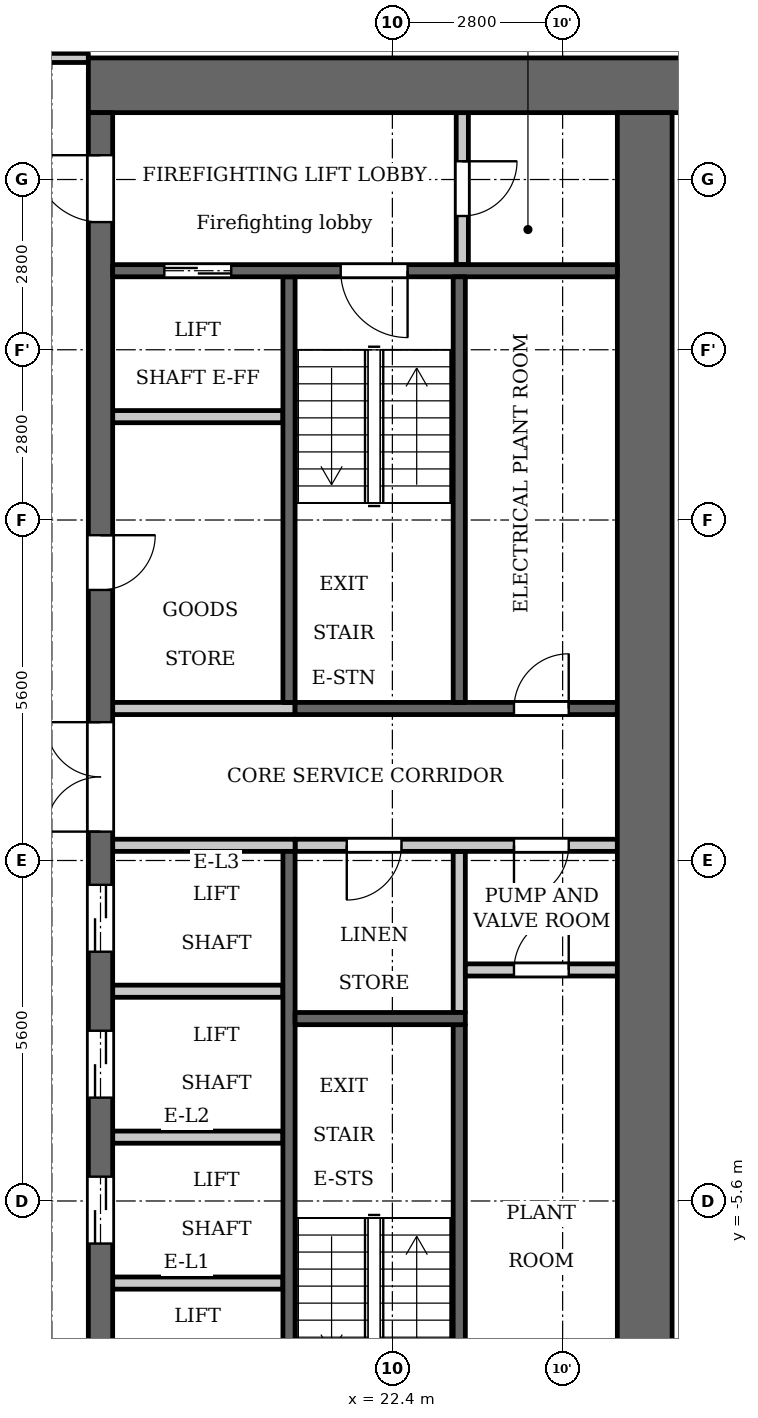
"""IFC4 building model, lengths in metres.
Left out: names, types, materials, properties, quantities, classifications, styles, units other than length and angle.
Written with IfcOpenShell. Run it as: python <this file> out.ifc"""

import sys

from ifc_helpers import new_model, si_unit, direction, frame, frame_2d, origin, place, context, subcontext, project, spatial, rectangle, extrude, element, fill, save


model = new_model("IFC4")
c1 = context("Model", 3, precision=1e-05, world=origin(), true_north=direction((0.0, 1.0)))
c2 = subcontext(c1, "Body", "Model", "MODEL_VIEW")
j1 = project(units=[si_unit("LENGTHUNIT", "METRE"), si_unit("PLANEANGLEUNIT", "RADIAN")], contexts=[c1])
p1 = place(None, origin())
s1 = spatial("IfcSite", under=j1, at=p1, CompositionType="ELEMENT")
p2 = place(p1, origin())
s2 = spatial("IfcBuilding", under=s1, at=p2, CompositionType="ELEMENT")
p3 = place(p2, frame((0.0, 0.0, 30.5)))
s3 = spatial("IfcBuildingStorey", under=s2, at=p3, CompositionType="ELEMENT", Elevation=30.5)
p4 = place(p3, frame((23.5, -2.5, 0.0), z_axis=(0.0, 0.0, 1.0), x_axis=(0.0, 1.0, 0.0)))
e1 = element("IfcWall", 1, at=p4, inside=s3, PredefinedType="PARTITIONING", context=c2, shape_type="SweptSolid", body=[
    extrude(rectangle(XDim=2.65, YDim=0.2, at=frame_2d((1.325, 0.0))), origin(), (0.0, 0.0, 1.0), 3.2),
])
p5 = place(p3, frame((20.7, 2.6, 0.0), z_axis=(0.0, 0.0, 1.0), x_axis=(0.0, 1.0, 0.0)))
e2 = element("IfcWall", 2, at=p5, inside=s3, PredefinedType="SHEAR", context=c2, shape_type="SweptSolid", body=[
    extrude(rectangle(XDim=7.0, YDim=0.2, at=frame_2d((3.5, 0.0))), origin(), (0.0, 0.0, 1.0), 3.2),
])
p6 = place(p3, frame((20.7, -9.6, 0.0), z_axis=(0.0, 0.0, 1.0), x_axis=(0.0, 1.0, 0.0)))
e3 = element("IfcWall", 3, at=p6, inside=s3, PredefinedType="SHEAR", context=c2, shape_type="SweptSolid", body=[
    extrude(rectangle(XDim=9.75, YDim=0.2, at=frame_2d((4.875, 0.0))), origin(), (0.0, 0.0, 1.0), 3.2),
])
p7 = place(p3, frame((20.8, 2.5, 0.0), z_axis=(0.0, 0.0, 1.0), x_axis=(1.0, 0.0, 0.0)))
e4 = element("IfcWall", 4, at=p7, inside=s3, PredefinedType="SHEAR", context=c2, shape_type="SweptSolid", body=[
    extrude(rectangle(XDim=5.3, YDim=0.2, at=frame_2d((2.65, 0.0))), origin(), (0.0, 0.0, 1.0), 3.2),
])
p8 = place(p7, frame((3.6, 0.0, 0.0)))
e5 = element("IfcOpeningElement", 5, at=p8, cuts=e4, PredefinedType="OPENING", context=c2, shape_type="SweptSolid", body=[
    extrude(rectangle(XDim=0.9, YDim=2.1, at=frame_2d((0.45, 1.05))), frame((0.0, 0.11, 0.0), z_axis=(0.0, -1.0, 0.0), x_axis=(1.0, 0.0, 0.0)), (0.0, 0.0, 1.0), 0.22),
])
p9 = place(p3, frame((20.8, 0.25, 0.0), z_axis=(0.0, 0.0, 1.0), x_axis=(1.0, 0.0, 0.0)))
e6 = element("IfcWall", 6, at=p9, inside=s3, PredefinedType="PARTITIONING", context=c2, shape_type="SweptSolid", body=[
    extrude(rectangle(XDim=5.3, YDim=0.2, at=frame_2d((2.65, 0.0))), origin(), (0.0, 0.0, 1.0), 3.2),
])
p10 = place(p9, frame((0.85, 0.0, 0.0)))
e7 = element("IfcOpeningElement", 7, at=p10, cuts=e6, PredefinedType="OPENING", context=c2, shape_type="SweptSolid", body=[
    extrude(rectangle(XDim=0.9, YDim=2.1, at=frame_2d((0.45, 1.05))), frame((0.0, 0.11, 0.0), z_axis=(0.0, -1.0, 0.0), x_axis=(1.0, 0.0, 0.0)), (0.0, 0.0, 1.0), 0.22),
])
p11 = place(p9, frame((3.6, 0.0, 0.0)))
e8 = element("IfcOpeningElement", 8, at=p11, cuts=e6, PredefinedType="OPENING", context=c2, shape_type="SweptSolid", body=[
    extrude(rectangle(XDim=0.9, YDim=2.1, at=frame_2d((0.45, 1.05))), frame((0.0, 0.11, 0.0), z_axis=(0.0, -1.0, 0.0), x_axis=(1.0, 0.0, 0.0)), (0.0, 0.0, 1.0), 0.22),
])
p12 = place(p3, frame((17.4, 12.75, 0.0), z_axis=(0.0, 0.0, 1.0), x_axis=(1.0, 0.0, 0.0)))
e9 = element("IfcWall", 9, at=p12, inside=s3, PredefinedType="SHEAR", context=c2, shape_type="SweptSolid", body=[
    extrude(rectangle(XDim=10.4, YDim=0.9, at=frame_2d((5.2, 0.0))), origin(), (0.0, 0.0, 1.0), 3.2),
])
p13 = place(p3, frame((17.6, -12.3, 0.0), z_axis=(0.0, 0.0, 1.0), x_axis=(0.0, 1.0, 0.0)))
e10 = element("IfcWall", 10, at=p13, inside=s3, PredefinedType="SHEAR", context=c2, shape_type="SweptSolid", body=[
    extrude(rectangle(XDim=24.6, YDim=0.4, at=frame_2d((12.3, 0.0))), origin(), (0.0, 0.0, 1.0), 3.2),
])
p14 = place(p13, frame((6.0, 0.0, 0.0)))
e11 = element("IfcOpeningElement", 11, at=p14, cuts=e10, PredefinedType="OPENING", context=c2, shape_type="SweptSolid", body=[
    extrude(rectangle(XDim=1.1, YDim=2.1, at=frame_2d((0.55, 1.05))), frame((0.0, 0.21, 0.0), z_axis=(0.0, -1.0, 0.0), x_axis=(1.0, 0.0, 0.0)), (0.0, 0.0, 1.0), 0.42),
])
p15 = place(p13, frame((8.4, 0.0, 0.0)))
e12 = element("IfcOpeningElement", 12, at=p15, cuts=e10, PredefinedType="OPENING", context=c2, shape_type="SweptSolid", body=[
    extrude(rectangle(XDim=1.1, YDim=2.1, at=frame_2d((0.55, 1.05))), frame((0.0, 0.21, 0.0), z_axis=(0.0, -1.0, 0.0), x_axis=(1.0, 0.0, 0.0)), (0.0, 0.0, 1.0), 0.42),
])
p16 = place(p13, frame((10.8, 0.0, 0.0)))
e13 = element("IfcOpeningElement", 13, at=p16, cuts=e10, PredefinedType="OPENING", context=c2, shape_type="SweptSolid", body=[
    extrude(rectangle(XDim=1.1, YDim=2.1, at=frame_2d((0.55, 1.05))), frame((0.0, 0.21, 0.0), z_axis=(0.0, -1.0, 0.0), x_axis=(1.0, 0.0, 0.0)), (0.0, 0.0, 1.0), 0.42),
])
p17 = place(p13, frame((16.75, 0.0, 0.0)))
e14 = element("IfcOpeningElement", 14, at=p17, cuts=e10, PredefinedType="OPENING", context=c2, shape_type="SweptSolid", body=[
    extrude(rectangle(XDim=0.9, YDim=2.1, at=frame_2d((0.45, 1.05))), frame((0.0, 0.21, 0.0), z_axis=(0.0, -1.0, 0.0), x_axis=(1.0, 0.0, 0.0)), (0.0, 0.0, 1.0), 0.42),
])
p18 = place(p13, frame((22.8, 0.0, 0.0)))
e15 = element("IfcOpeningElement", 15, at=p18, cuts=e10, PredefinedType="OPENING", context=c2, shape_type="SweptSolid", body=[
    extrude(rectangle(XDim=1.1, YDim=2.1, at=frame_2d((0.55, 1.05))), frame((0.0, 0.21, 0.0), z_axis=(0.0, -1.0, 0.0), x_axis=(1.0, 0.0, 0.0)), (0.0, 0.0, 1.0), 0.42),
])
p19 = place(p13, frame((0.7, 0.0, 0.0)))
e16 = element("IfcOpeningElement", 16, at=p19, cuts=e10, PredefinedType="OPENING", context=c2, shape_type="SweptSolid", body=[
    extrude(rectangle(XDim=1.1, YDim=2.1, at=frame_2d((0.55, 1.05))), frame((0.0, 0.21, 0.0), z_axis=(0.0, -1.0, 0.0), x_axis=(1.0, 0.0, 0.0)), (0.0, 0.0, 1.0), 0.42),
])
p20 = place(p13, frame((12.775, 0.0, 0.0)))
e17 = element("IfcOpeningElement", 17, at=p20, cuts=e10, PredefinedType="OPENING", context=c2, shape_type="SweptSolid", body=[
    extrude(rectangle(XDim=1.8, YDim=2.1, at=frame_2d((0.9, 1.05))), frame((0.0, 0.21, 0.0), z_axis=(0.0, -1.0, 0.0), x_axis=(1.0, 0.0, 0.0)), (0.0, 0.0, 1.0), 0.42),
])
p21 = place(p3, frame((26.55, -12.3, 0.0), z_axis=(0.0, 0.0, 1.0), x_axis=(0.0, 1.0, 0.0)))
e18 = element("IfcWall", 18, at=p21, inside=s3, PredefinedType="SHEAR", context=c2, shape_type="SweptSolid", body=[
    extrude(rectangle(XDim=24.6, YDim=0.9, at=frame_2d((12.3, 0.0))), origin(), (0.0, 0.0, 1.0), 3.2),
])
p22 = place(p3, frame((23.55, 9.8, 0.0), z_axis=(0.0, 0.0, 1.0), x_axis=(0.0, 1.0, 0.0)))
e19 = element("IfcWall", 19, at=p22, inside=s3, PredefinedType="PARTITIONING", context=c2, shape_type="SweptSolid", body=[
    extrude(rectangle(XDim=2.5, YDim=0.2, at=frame_2d((1.25, 0.0))), origin(), (0.0, 0.0, 1.0), 3.2),
])
p23 = place(p22, frame((0.8, 0.0, 0.0)))
e20 = element("IfcOpeningElement", 20, at=p23, cuts=e19, PredefinedType="OPENING", context=c2, shape_type="SweptSolid", body=[
    extrude(rectangle(XDim=0.9, YDim=2.1, at=frame_2d((0.45, 1.05))), frame((0.0, 0.11, 0.0), z_axis=(0.0, -1.0, 0.0), x_axis=(1.0, 0.0, 0.0)), (0.0, 0.0, 1.0), 0.22),
])
p24 = place(p3, frame((23.6, -1.8, 0.0), z_axis=(0.0, 0.0, 1.0), x_axis=(1.0, 0.0, 0.0)))
e21 = element("IfcWall", 21, at=p24, inside=s3, PredefinedType="PARTITIONING", context=c2, shape_type="SweptSolid", body=[
    extrude(rectangle(XDim=2.5, YDim=0.2, at=frame_2d((1.25, 0.0))), origin(), (0.0, 0.0, 1.0), 3.2),
])
p25 = place(p24, frame((0.8, 0.0, 0.0)))
e22 = element("IfcOpeningElement", 22, at=p25, cuts=e21, PredefinedType="OPENING", context=c2, shape_type="SweptSolid", body=[
    extrude(rectangle(XDim=0.9, YDim=2.1, at=frame_2d((0.45, 1.05))), frame((0.0, 0.11, 0.0), z_axis=(0.0, -1.0, 0.0), x_axis=(1.0, 0.0, 0.0)), (0.0, 0.0, 1.0), 0.22),
])
for number, where, z_axis, x_axis in (
    (23, (17.8, -6.95, 0.0), (0.0, 0.0, 1.0), (1.0, 0.0, 0.0)),
    (24, (17.8, -4.55, 0.0), (0.0, 0.0, 1.0), (1.0, 0.0, 0.0)),
    (25, (17.8, -2.15, 0.0), (0.0, 0.0, 1.0), (1.0, 0.0, 0.0)),
):
    element("IfcWall", number, at=place(p3, frame(where, z_axis=z_axis, x_axis=x_axis)), inside=s3, PredefinedType="PARTITIONING", context=c2, shape_type="SweptSolid", body=[
        extrude(rectangle(XDim=2.8, YDim=0.2, at=frame_2d((1.4, 0.0))), origin(), (0.0, 0.0, 1.0), 3.2),
    ])
for number, where, z_axis, x_axis in (
    (26, (17.8, 0.25, 0.0), (0.0, 0.0, 1.0), (1.0, 0.0, 0.0)),
    (27, (17.8, 2.5, 0.0), (0.0, 0.0, 1.0), (1.0, 0.0, 0.0)),
):
    element("IfcWall", number, at=place(p3, frame(where, z_axis=z_axis, x_axis=x_axis)), inside=s3, PredefinedType="PARTITIONING", context=c2, shape_type="SweptSolid", body=[
        extrude(rectangle(XDim=3.0, YDim=0.2, at=frame_2d((1.5, 0.0))), origin(), (0.0, 0.0, 1.0), 3.2),
    ])
p26 = place(p3, frame((17.8, 7.3, 0.0), z_axis=(0.0, 0.0, 1.0), x_axis=(1.0, 0.0, 0.0)))
e28 = element("IfcWall", 28, at=p26, inside=s3, PredefinedType="PARTITIONING", context=c2, shape_type="SweptSolid", body=[
    extrude(rectangle(XDim=2.8, YDim=0.2, at=frame_2d((1.4, 0.0))), origin(), (0.0, 0.0, 1.0), 3.2),
])
p27 = place(p3, frame((17.8, 9.7, 0.0), z_axis=(0.0, 0.0, 1.0), x_axis=(1.0, 0.0, 0.0)))
e29 = element("IfcWall", 29, at=p27, inside=s3, PredefinedType="SHEAR", context=c2, shape_type="SweptSolid", body=[
    extrude(rectangle(XDim=8.3, YDim=0.2, at=frame_2d((4.15, 0.0))), origin(), (0.0, 0.0, 1.0), 3.2),
])
p28 = place(p27, frame((0.85, 0.0, 0.0)))
e30 = element("IfcOpeningElement", 30, at=p28, cuts=e29, PredefinedType="OPENING", context=c2, shape_type="SweptSolid", body=[
    extrude(rectangle(XDim=1.1, YDim=2.1, at=frame_2d((0.55, 1.05))), frame((0.0, 0.11, 0.0), z_axis=(0.0, -1.0, 0.0), x_axis=(1.0, 0.0, 0.0)), (0.0, 0.0, 1.0), 0.22),
])
p29 = place(p27, frame((3.75, 0.0, 0.0)))
e31 = element("IfcOpeningElement", 31, at=p29, cuts=e29, PredefinedType="OPENING", context=c2, shape_type="SweptSolid", body=[
    extrude(rectangle(XDim=1.1, YDim=2.1, at=frame_2d((0.55, 1.05))), frame((0.0, 0.11, 0.0), z_axis=(0.0, -1.0, 0.0), x_axis=(1.0, 0.0, 0.0)), (0.0, 0.0, 1.0), 0.22),
])
p30 = place(p3, frame((23.5, 2.6, 0.0), z_axis=(0.0, 0.0, 1.0), x_axis=(0.0, 1.0, 0.0)))
e32 = element("IfcWall", 32, at=p30, inside=s3, PredefinedType="SHEAR", context=c2, shape_type="SweptSolid", body=[
    extrude(rectangle(XDim=7.0, YDim=0.2, at=frame_2d((3.5, 0.0))), origin(), (0.0, 0.0, 1.0), 3.2),
])
p31 = place(p3, frame((23.5, -9.6, 0.0), z_axis=(0.0, 0.0, 1.0), x_axis=(0.0, 1.0, 0.0)))
e33 = element("IfcWall", 33, at=p31, inside=s3, PredefinedType="SHEAR", context=c2, shape_type="SweptSolid", body=[
    extrude(rectangle(XDim=6.9, YDim=0.2, at=frame_2d((3.45, 0.0))), origin(), (0.0, 0.0, 1.0), 3.2),
])
p32 = place(p3, frame((20.8, -2.6, 0.0), z_axis=(0.0, 0.0, 1.0), x_axis=(1.0, 0.0, 0.0)))
e34 = element("IfcWall", 34, at=p32, inside=s3, PredefinedType="SHEAR", context=c2, shape_type="SweptSolid", body=[
    extrude(rectangle(XDim=2.8, YDim=0.2, at=frame_2d((1.4, 0.0))), origin(), (0.0, 0.0, 1.0), 3.2),
])
p33 = place(p3, frame((-17.4, 13.2, 0.0), z_axis=(0.0, 0.0, 1.0), x_axis=(1.0, 0.0, 0.0)))
e35 = element("IfcWall", 35, at=p33, inside=s3, PredefinedType="PARTITIONING", context=c2, shape_type="SweptSolid", body=[
    extrude(rectangle(XDim=34.8, YDim=0.15, at=frame_2d((17.4, 0.0))), origin(), (0.0, 0.0, 1.0), 3.2),
])
p34 = place(p33, frame((0.75, 0.0, 0.0)))
e36 = element("IfcOpeningElement", 36, at=p34, cuts=e35, PredefinedType="OPENING", context=c2, shape_type="SweptSolid", body=[
    extrude(rectangle(XDim=1.0, YDim=2.1, at=frame_2d((0.5, 1.05))), frame((0.0, 0.085, 0.0), z_axis=(0.0, -1.0, 0.0), x_axis=(1.0, 0.0, 0.0)), (0.0, 0.0, 1.0), 0.17),
])
p35 = place(p33, frame((33.15, 0.0, 0.0)))
e37 = element("IfcOpeningElement", 37, at=p35, cuts=e35, PredefinedType="OPENING", context=c2, shape_type="SweptSolid", body=[
    extrude(rectangle(XDim=1.0, YDim=2.1, at=frame_2d((0.5, 1.05))), frame((0.0, 0.085, 0.0), z_axis=(0.0, -1.0, 0.0), x_axis=(1.0, 0.0, 0.0)), (0.0, 0.0, 1.0), 0.17),
])
p36 = place(p33, frame((3.05, 0.0, 0.0)))
e38 = element("IfcOpeningElement", 38, at=p36, cuts=e35, PredefinedType="OPENING", context=c2, shape_type="SweptSolid", body=[
    extrude(rectangle(XDim=1.0, YDim=2.1, at=frame_2d((0.5, 1.05))), frame((0.0, 0.085, 0.0), z_axis=(0.0, -1.0, 0.0), x_axis=(1.0, 0.0, 0.0)), (0.0, 0.0, 1.0), 0.17),
])
p37 = place(p33, frame((10.1, 0.0, 0.0)))
e39 = element("IfcOpeningElement", 39, at=p37, cuts=e35, PredefinedType="OPENING", context=c2, shape_type="SweptSolid", body=[
    extrude(rectangle(XDim=1.0, YDim=2.1, at=frame_2d((0.5, 1.05))), frame((0.0, 0.085, 0.0), z_axis=(0.0, -1.0, 0.0), x_axis=(1.0, 0.0, 0.0)), (0.0, 0.0, 1.0), 0.17),
])
p38 = place(p33, frame((12.45, 0.0, 0.0)))
e40 = element("IfcOpeningElement", 40, at=p38, cuts=e35, PredefinedType="OPENING", context=c2, shape_type="SweptSolid", body=[
    extrude(rectangle(XDim=1.0, YDim=2.1, at=frame_2d((0.5, 1.05))), frame((0.0, 0.085, 0.0), z_axis=(0.0, -1.0, 0.0), x_axis=(1.0, 0.0, 0.0)), (0.0, 0.0, 1.0), 0.17),
])
p39 = place(p33, frame((21.3, 0.0, 0.0)))
e41 = element("IfcOpeningElement", 41, at=p39, cuts=e35, PredefinedType="OPENING", context=c2, shape_type="SweptSolid", body=[
    extrude(rectangle(XDim=1.0, YDim=2.1, at=frame_2d((0.5, 1.05))), frame((0.0, 0.085, 0.0), z_axis=(0.0, -1.0, 0.0), x_axis=(1.0, 0.0, 0.0)), (0.0, 0.0, 1.0), 0.17),
])
p40 = place(p33, frame((23.65, 0.0, 0.0)))
e42 = element("IfcOpeningElement", 42, at=p40, cuts=e35, PredefinedType="OPENING", context=c2, shape_type="SweptSolid", body=[
    extrude(rectangle(XDim=1.0, YDim=2.1, at=frame_2d((0.5, 1.05))), frame((0.0, 0.085, 0.0), z_axis=(0.0, -1.0, 0.0), x_axis=(1.0, 0.0, 0.0)), (0.0, 0.0, 1.0), 0.17),
])
p41 = place(p33, frame((30.75, 0.0, 0.0)))
e43 = element("IfcOpeningElement", 43, at=p41, cuts=e35, PredefinedType="OPENING", context=c2, shape_type="SweptSolid", body=[
    extrude(rectangle(XDim=1.0, YDim=2.1, at=frame_2d((0.5, 1.05))), frame((0.0, 0.085, 0.0), z_axis=(0.0, -1.0, 0.0), x_axis=(1.0, 0.0, 0.0)), (0.0, 0.0, 1.0), 0.17),
])
p42 = place(p14, origin())
e44 = element("IfcDoor", 44, at=p42, inside=s3, OperationType="DOUBLE_DOOR_SLIDING", PredefinedType="DOOR", context=c2, shape_type="SweptSolid", body=[
    extrude(rectangle(XDim=1.1, YDim=2.1, at=frame_2d((0.55, 1.05))), frame((0.0, 0.025, 0.0), z_axis=(0.0, -1.0, 0.0), x_axis=(1.0, 0.0, 0.0)), (0.0, 0.0, 1.0), 0.05),
])
fill(e11, e44)
p43 = place(p15, origin())
e45 = element("IfcDoor", 45, at=p43, inside=s3, OperationType="DOUBLE_DOOR_SLIDING", PredefinedType="DOOR", context=c2, shape_type="SweptSolid", body=[
    extrude(rectangle(XDim=1.1, YDim=2.1, at=frame_2d((0.55, 1.05))), frame((0.0, 0.025, 0.0), z_axis=(0.0, -1.0, 0.0), x_axis=(1.0, 0.0, 0.0)), (0.0, 0.0, 1.0), 0.05),
])
fill(e12, e45)
p44 = place(p16, origin())
e46 = element("IfcDoor", 46, at=p44, inside=s3, OperationType="DOUBLE_DOOR_SLIDING", PredefinedType="DOOR", context=c2, shape_type="SweptSolid", body=[
    extrude(rectangle(XDim=1.1, YDim=2.1, at=frame_2d((0.55, 1.05))), frame((0.0, 0.025, 0.0), z_axis=(0.0, -1.0, 0.0), x_axis=(1.0, 0.0, 0.0)), (0.0, 0.0, 1.0), 0.05),
])
fill(e13, e46)
p45 = place(p17, origin())
e47 = element("IfcDoor", 47, at=p45, inside=s3, OperationType="SINGLE_SWING_RIGHT", PredefinedType="DOOR", context=c2, shape_type="SweptSolid", body=[
    extrude(rectangle(XDim=0.9, YDim=2.1, at=frame_2d((0.45, 1.05))), frame((0.0, 0.025, 0.0), z_axis=(0.0, -1.0, 0.0), x_axis=(1.0, 0.0, 0.0)), (0.0, 0.0, 1.0), 0.05),
])
fill(e14, e47)
p46 = place(p28, origin())
e48 = element("IfcDoor", 48, at=p46, inside=s3, OperationType="DOUBLE_DOOR_SLIDING", PredefinedType="DOOR", context=c2, shape_type="SweptSolid", body=[
    extrude(rectangle(XDim=1.1, YDim=2.1, at=frame_2d((0.55, 1.05))), frame((0.0, 0.025, 0.0), z_axis=(0.0, -1.0, 0.0), x_axis=(1.0, 0.0, 0.0)), (0.0, 0.0, 1.0), 0.05),
])
fill(e30, e48)
p47 = place(p18, origin())
e49 = element("IfcDoor", 49, at=p47, inside=s3, OperationType="SINGLE_SWING_LEFT", PredefinedType="DOOR", context=c2, shape_type="SweptSolid", body=[
    extrude(rectangle(XDim=1.1, YDim=2.1, at=frame_2d((0.55, 1.05))), frame((0.0, 0.025, 0.0), z_axis=(0.0, -1.0, 0.0), x_axis=(1.0, 0.0, 0.0)), (0.0, 0.0, 1.0), 0.05),
])
fill(e15, e49)
p48 = place(p23, origin())
e50 = element("IfcDoor", 50, at=p48, inside=s3, OperationType="SINGLE_SWING_RIGHT", PredefinedType="DOOR", context=c2, shape_type="SweptSolid", body=[
    extrude(rectangle(XDim=0.9, YDim=2.1, at=frame_2d((0.45, 1.05))), frame((0.0, 0.025, 0.0), z_axis=(0.0, -1.0, 0.0), x_axis=(1.0, 0.0, 0.0)), (0.0, 0.0, 1.0), 0.05),
])
fill(e20, e50)
p49 = place(p29, origin())
e51 = element("IfcDoor", 51, at=p49, inside=s3, OperationType="SINGLE_SWING_RIGHT", PredefinedType="DOOR", context=c2, shape_type="SweptSolid", body=[
    extrude(rectangle(XDim=1.1, YDim=2.1, at=frame_2d((0.55, 1.05))), frame((0.0, 0.025, 0.0), z_axis=(0.0, -1.0, 0.0), x_axis=(1.0, 0.0, 0.0)), (0.0, 0.0, 1.0), 0.05),
])
fill(e31, e51)
p50 = place(p20, origin())
e52 = element("IfcDoor", 52, at=p50, inside=s3, OperationType="DOUBLE_DOOR_SINGLE_SWING", PredefinedType="DOOR", context=c2, shape_type="SweptSolid", body=[
    extrude(rectangle(XDim=1.8, YDim=2.1, at=frame_2d((0.9, 1.05))), frame((0.0, 0.025, 0.0), z_axis=(0.0, -1.0, 0.0), x_axis=(1.0, 0.0, 0.0)), (0.0, 0.0, 1.0), 0.05),
])
fill(e17, e52)
p51 = place(p10, origin())
e53 = element("IfcDoor", 53, at=p51, inside=s3, OperationType="SINGLE_SWING_LEFT", PredefinedType="DOOR", context=c2, shape_type="SweptSolid", body=[
    extrude(rectangle(XDim=0.9, YDim=2.1, at=frame_2d((0.45, 1.05))), frame((0.0, 0.025, 0.0), z_axis=(0.0, -1.0, 0.0), x_axis=(1.0, 0.0, 0.0)), (0.0, 0.0, 1.0), 0.05),
])
fill(e7, e53)
p52 = place(p25, origin())
e54 = element("IfcDoor", 54, at=p52, inside=s3, OperationType="SINGLE_SWING_LEFT", PredefinedType="DOOR", context=c2, shape_type="SweptSolid", body=[
    extrude(rectangle(XDim=0.9, YDim=2.1, at=frame_2d((0.45, 1.05))), frame((0.0, 0.025, 0.0), z_axis=(0.0, -1.0, 0.0), x_axis=(1.0, 0.0, 0.0)), (0.0, 0.0, 1.0), 0.05),
])
fill(e22, e54)
p53 = place(p11, origin())
e55 = element("IfcDoor", 55, at=p53, inside=s3, OperationType="SINGLE_SWING_LEFT", PredefinedType="DOOR", context=c2, shape_type="SweptSolid", body=[
    extrude(rectangle(XDim=0.9, YDim=2.1, at=frame_2d((0.45, 1.05))), frame((0.0, 0.025, 0.0), z_axis=(0.0, -1.0, 0.0), x_axis=(1.0, 0.0, 0.0)), (0.0, 0.0, 1.0), 0.05),
])
fill(e8, e55)
p54 = place(p8, origin())
e56 = element("IfcDoor", 56, at=p54, inside=s3, OperationType="SINGLE_SWING_LEFT", PredefinedType="DOOR", context=c2, shape_type="SweptSolid", body=[
    extrude(rectangle(XDim=0.9, YDim=2.1, at=frame_2d((0.45, 1.05))), frame((0.0, 0.025, 0.0), z_axis=(0.0, -1.0, 0.0), x_axis=(1.0, 0.0, 0.0)), (0.0, 0.0, 1.0), 0.05),
])
fill(e5, e56)
save(model, sys.argv[1])
